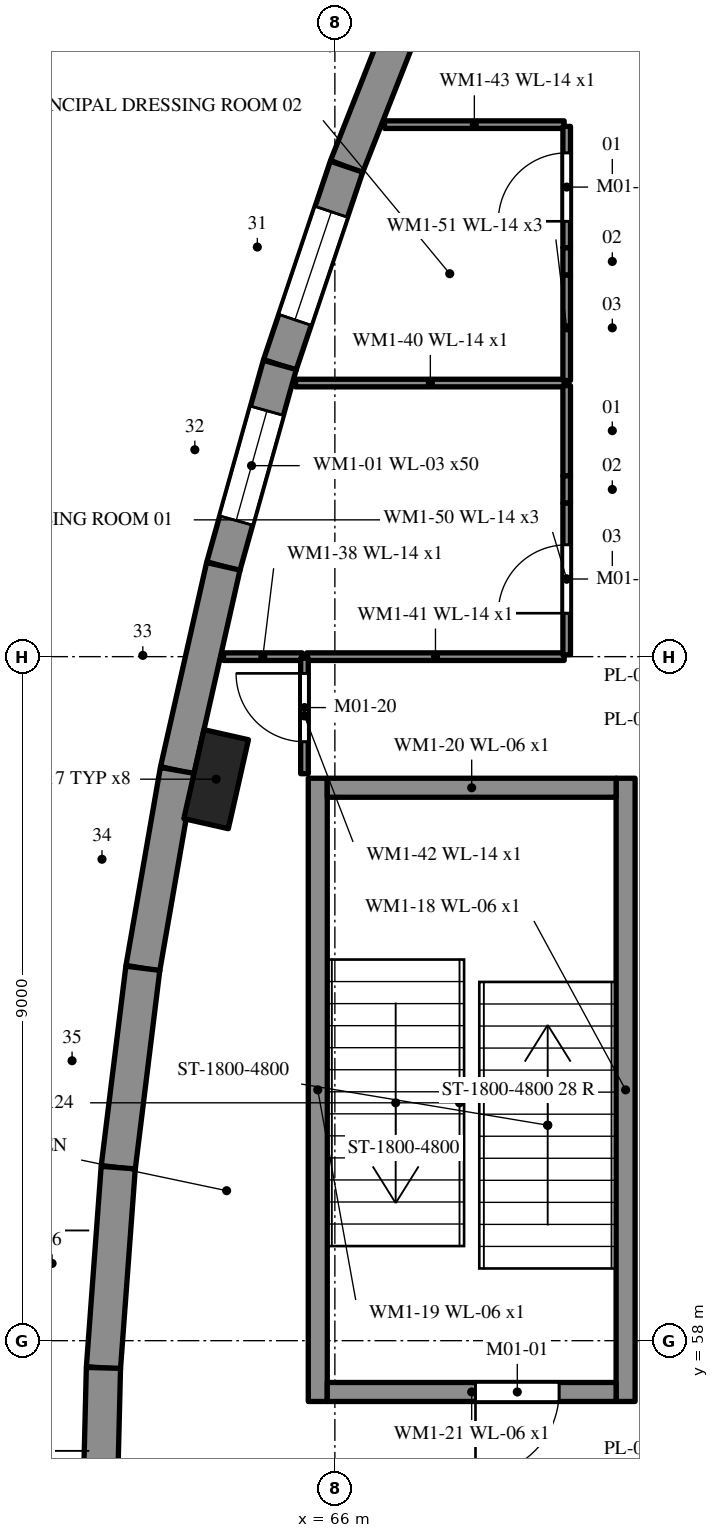
"""IFC4 building model, lengths in metres.
Left out: names, types, materials, properties, quantities, classifications, styles, units other than length and angle.
Written with IfcOpenShell. Run it as: python <this file> out.ifc"""

import sys

from ifc_helpers import new_model, si_unit, direction, frame, frame_2d, origin, origin_2d, place, context, subcontext, project, spatial, polyline, rectangle, outline, extrude, element, fill, save


model = new_model("IFC4")
c1 = context("Model", 3, precision=1e-05, world=origin(), true_north=direction((0.0, 1.0)))
c2 = subcontext(c1, "Body", "Model", "MODEL_VIEW")
j1 = project(units=[si_unit("LENGTHUNIT", "METRE"), si_unit("PLANEANGLEUNIT", "RADIAN")], contexts=[c1])
p1 = place(None, origin())
s1 = spatial("IfcSite", under=j1, at=p1, CompositionType="ELEMENT")
p2 = place(p1, origin())
s2 = spatial("IfcBuilding", under=s1, at=p2, CompositionType="ELEMENT")
p3 = place(p2, frame((0.0, 0.0, 5.4)))
s3 = spatial("IfcBuildingStorey", under=s2, at=p3, CompositionType="ELEMENT", Elevation=5.4)
p4 = place(p3, frame((67.163, 76.007, 0.0), z_axis=(0.0, 0.0, 1.0), x_axis=(-0.366920100653, -0.930252460215, 0.0)))
e1 = element("IfcWall", 1, at=p4, inside=s3, PredefinedType="SOLIDWALL", context=c2, shape_type="SweptSolid", body=[
    extrude(rectangle(XDim=2.752, YDim=0.45, at=frame_2d((1.376, 0.0))), origin(), (0.0, 0.0, 1.0), 4.8),
])
p5 = place(p3, frame((66.153, 73.447, 0.0), z_axis=(0.0, 0.0, 1.0), x_axis=(-0.318887614688, -0.947792534893, 0.0)))
e2 = element("IfcWall", 2, at=p5, inside=s3, PredefinedType="SOLIDWALL", context=c2, shape_type="SweptSolid", body=[
    extrude(rectangle(XDim=2.752, YDim=0.45, at=frame_2d((1.376, 0.0))), origin(), (0.0, 0.0, 1.0), 4.8),
])
p6 = place(p5, frame((0.626, 0.0, 0.9)))
e3 = element("IfcOpeningElement", 3, at=p6, cuts=e2, PredefinedType="OPENING", context=c2, shape_type="SweptSolid", body=[
    extrude(rectangle(XDim=1.5, YDim=2.1, at=frame_2d((0.75, 1.05))), frame((0.0, 0.235, 0.0), z_axis=(0.0, -1.0, 0.0), x_axis=(1.0, 0.0, 0.0)), (0.0, 0.0, 1.0), 0.47),
])
p7 = place(p3, frame((65.275, 70.838, 0.0), z_axis=(0.0, 0.0, 1.0), x_axis=(-0.270008269196, -0.962858003324, 0.0)))
e4 = element("IfcWall", 4, at=p7, inside=s3, PredefinedType="SOLIDWALL", context=c2, shape_type="SweptSolid", body=[
    extrude(rectangle(XDim=2.752, YDim=0.45, at=frame_2d((1.376, 0.0))), origin(), (0.0, 0.0, 1.0), 4.8),
])
p8 = place(p7, frame((0.626, 0.0, 0.9)))
e5 = element("IfcOpeningElement", 5, at=p8, cuts=e4, PredefinedType="OPENING", context=c2, shape_type="SweptSolid", body=[
    extrude(rectangle(XDim=1.5, YDim=2.1, at=frame_2d((0.75, 1.05))), frame((0.0, 0.235, 0.0), z_axis=(0.0, -1.0, 0.0), x_axis=(1.0, 0.0, 0.0)), (0.0, 0.0, 1.0), 0.47),
])
p9 = place(p3, frame((64.532, 68.188, 0.0), z_axis=(0.0, 0.0, 1.0), x_axis=(-0.220347996563, -0.975421324562, 0.0)))
e6 = element("IfcWall", 6, at=p9, inside=s3, PredefinedType="SOLIDWALL", context=c2, shape_type="SweptSolid", body=[
    extrude(rectangle(XDim=2.752, YDim=0.45, at=frame_2d((1.376, 0.0))), origin(), (0.0, 0.0, 1.0), 4.8),
])
p10 = place(p3, frame((63.926, 65.503, 0.0), z_axis=(0.0, 0.0, 1.0), x_axis=(-0.171196910379, -0.985236833394, 0.0)))
e7 = element("IfcWall", 7, at=p10, inside=s3, PredefinedType="SOLIDWALL", context=c2, shape_type="SweptSolid", body=[
    extrude(rectangle(XDim=2.643, YDim=0.45, at=frame_2d((1.321, 0.0))), origin(), (0.0, 0.0, 1.0), 4.8),
])
p11 = place(p3, frame((63.473, 62.9, 0.0), z_axis=(0.0, 0.0, 1.0), x_axis=(-0.122499610212, -0.992468561466, 0.0)))
e8 = element("IfcWall", 8, at=p11, inside=s3, PredefinedType="SOLIDWALL", context=c2, shape_type="SweptSolid", body=[
    extrude(rectangle(XDim=2.643, YDim=0.45, at=frame_2d((1.321, 0.0))), origin(), (0.0, 0.0, 1.0), 4.8),
])
p12 = place(p3, frame((63.15, 60.277, 0.0), z_axis=(0.0, 0.0, 1.0), x_axis=(-0.07363685767, -0.997285121313, 0.0)))
e9 = element("IfcWall", 9, at=p12, inside=s3, PredefinedType="SOLIDWALL", context=c2, shape_type="SweptSolid", body=[
    extrude(rectangle(XDim=2.642, YDim=0.45, at=frame_2d((1.321, 0.0))), origin(), (0.0, 0.0, 1.0), 4.8),
])
p13 = place(p3, frame((62.955, 57.642, 0.0), z_axis=(0.0, 0.0, 1.0), x_axis=(-0.024666736886, -0.999695729756, 0.0)))
e10 = element("IfcWall", 10, at=p13, inside=s3, PredefinedType="SOLIDWALL", context=c2, shape_type="SweptSolid", body=[
    extrude(rectangle(XDim=2.643, YDim=0.45, at=frame_2d((1.321, 0.0))), origin(), (0.0, 0.0, 1.0), 4.8),
])
p14 = place(p3, frame((64.438, 65.388, 0.0), z_axis=(0.0, 0.0, 1.0), x_axis=(-0.220356962886, -0.975419299024, 0.0)))
e11 = element("IfcColumn", 11, at=p14, inside=s3, PredefinedType="PILASTER", context=c2, shape_type="SweptSolid", body=[
    extrude(rectangle(XDim=1.2, YDim=0.6, at=origin_2d()), origin(), (0.0, 0.0, 1.0), 4.8),
])
for number, where, z_axis, x_axis in (
    (12, (69.825, 57.2, 0.0), (0.0, 0.0, 1.0), (0.0, 1.0, 0.0)),
    (13, (65.775, 65.4, 0.0), (0.0, 0.0, 1.0), (0.0, -1.0, 0.0)),
):
    element("IfcWall", number, at=place(p3, frame(where, z_axis=z_axis, x_axis=x_axis)), inside=s3, PredefinedType="SHEAR", context=c2, shape_type="SweptSolid", body=[
        extrude(rectangle(XDim=8.2, YDim=0.25, at=frame_2d((4.1, 0.0))), origin(), (0.0, 0.0, 1.0), 4.8),
    ])
p15 = place(p3, frame((65.9, 65.275, 0.0), z_axis=(0.0, 0.0, 1.0), x_axis=(1.0, 0.0, 0.0)))
e14 = element("IfcWall", 14, at=p15, inside=s3, PredefinedType="SHEAR", context=c2, shape_type="SweptSolid", body=[
    extrude(rectangle(XDim=3.8, YDim=0.25, at=frame_2d((1.9, 0.0))), origin(), (0.0, 0.0, 1.0), 4.8),
])
p16 = place(p3, frame((69.7, 57.325, 0.0), z_axis=(0.0, 0.0, 1.0), x_axis=(-1.0, 0.0, 0.0)))
e15 = element("IfcWall", 15, at=p16, inside=s3, PredefinedType="SHEAR", context=c2, shape_type="SweptSolid", body=[
    extrude(rectangle(XDim=3.8, YDim=0.25, at=frame_2d((1.9, 0.0))), origin(), (0.0, 0.0, 1.0), 4.8),
])
p17 = place(p16, frame((0.75, 0.0, 0.0)))
e16 = element("IfcOpeningElement", 16, at=p17, cuts=e15, PredefinedType="OPENING", context=c2, shape_type="SweptSolid", body=[
    extrude(rectangle(XDim=1.1, YDim=2.1, at=frame_2d((0.55, 1.05))), frame((0.0, 0.135, 0.0), z_axis=(0.0, -1.0, 0.0), x_axis=(1.0, 0.0, 0.0)), (0.0, 0.0, 1.0), 0.27),
])
p18 = place(p3, frame((65.57, 67.0, 0.0), z_axis=(0.0, 0.0, 1.0), x_axis=(-1.0, 0.0, 0.0)))
e17 = element("IfcWall", 17, at=p18, inside=s3, PredefinedType="PARTITIONING", context=c2, shape_type="SweptSolid", body=[
    extrude(rectangle(XDim=1.035, YDim=0.1, at=frame_2d((0.518, 0.0))), origin(), (0.0, 0.0, 1.0), 4.55),
])
p19 = place(p3, frame((65.482, 70.6, 0.0), z_axis=(0.0, 0.0, 1.0), x_axis=(1.0, 0.0, 0.0)))
e18 = element("IfcWall", 18, at=p19, inside=s3, PredefinedType="PARTITIONING", context=c2, shape_type="SweptSolid", body=[
    extrude(rectangle(XDim=3.548, YDim=0.1, at=frame_2d((1.774, 0.0))), origin(), (0.0, 0.0, 1.0), 4.55),
])
p20 = place(p3, frame((69.017, 67.0, 0.0), z_axis=(0.0, 0.0, 1.0), x_axis=(-1.0, 0.0, 0.0)))
e19 = element("IfcWall", 19, at=p20, inside=s3, PredefinedType="PARTITIONING", context=c2, shape_type="SweptSolid", body=[
    extrude(rectangle(XDim=3.387, YDim=0.1, at=frame_2d((1.693, 0.0))), origin(), (0.0, 0.0, 1.0), 4.55),
])
p21 = place(p3, frame((65.6, 66.98, 0.0), z_axis=(0.0, 0.0, 1.0), x_axis=(0.0, -1.0, 0.0)))
e20 = element("IfcWall", 20, at=p21, inside=s3, PredefinedType="PARTITIONING", context=c2, shape_type="SweptSolid", body=[
    extrude(outline(polyline([(0.0, 0.0), (1.52, 0.0), (1.52, 4.55), (0.987, 4.55), (0.985, 3.82), (0.575, 3.82), (0.573, 4.55), (0.0, 4.55), (0.0, 0.0)])), frame((0.0, 0.05, 0.0), z_axis=(0.0, -1.0, 0.0), x_axis=(1.0, 0.0, 0.0)), (0.0, 0.0, 1.0), 0.1),
])
p22 = place(p21, frame((0.2, 0.0, 0.0)))
e21 = element("IfcOpeningElement", 21, at=p22, cuts=e20, PredefinedType="OPENING", context=c2, shape_type="SweptSolid", body=[
    extrude(rectangle(XDim=0.9, YDim=2.1, at=frame_2d((0.45, 1.05))), frame((0.0, 0.06, 0.0), z_axis=(0.0, -1.0, 0.0), x_axis=(1.0, 0.0, 0.0)), (0.0, 0.0, 1.0), 0.12),
])
p23 = place(p3, frame((66.653, 74.0, 0.0), z_axis=(0.0, 0.0, 1.0), x_axis=(1.0, 0.0, 0.0)))
e22 = element("IfcWall", 22, at=p23, inside=s3, PredefinedType="PARTITIONING", context=c2, shape_type="SweptSolid", body=[
    extrude(rectangle(XDim=2.364, YDim=0.1, at=frame_2d((1.182, 0.0))), origin(), (0.0, 0.0, 1.0), 4.55),
])
p24 = place(p3, frame((69.05, 70.567, 0.0), z_axis=(0.0, 0.0, 1.0), x_axis=(0.0, -1.0, 0.0)))
e23 = element("IfcWall", 23, at=p24, inside=s3, PredefinedType="PARTITIONING", context=c2, shape_type="SweptSolid", body=[
    extrude(rectangle(XDim=1.187, YDim=0.1, at=frame_2d((0.594, 0.0))), origin(), (0.0, 0.0, 1.0), 4.55),
])
p25 = place(p3, frame((69.05, 69.38, 0.0), z_axis=(0.0, 0.0, 1.0), x_axis=(0.0, -1.0, 0.0)))
e24 = element("IfcWall", 24, at=p25, inside=s3, PredefinedType="PARTITIONING", context=c2, shape_type="SweptSolid", body=[
    extrude(rectangle(XDim=0.36, YDim=0.1, at=frame_2d((0.18, 0.0))), origin(), (0.0, 0.0, 1.0), 3.92),
])
p26 = place(p3, frame((69.05, 69.02, 0.0), z_axis=(0.0, 0.0, 1.0), x_axis=(0.0, -1.0, 0.0)))
e25 = element("IfcWall", 25, at=p26, inside=s3, PredefinedType="PARTITIONING", context=c2, shape_type="SweptSolid", body=[
    extrude(rectangle(XDim=1.997, YDim=0.1, at=frame_2d((0.999, 0.0))), origin(), (0.0, 0.0, 1.0), 4.55),
])
p27 = place(p26, frame((0.548, 0.0, 0.0)))
e26 = element("IfcOpeningElement", 26, at=p27, cuts=e25, PredefinedType="OPENING", context=c2, shape_type="SweptSolid", body=[
    extrude(rectangle(XDim=0.9, YDim=2.1, at=frame_2d((0.45, 1.05))), frame((0.0, 0.06, 0.0), z_axis=(0.0, -1.0, 0.0), x_axis=(1.0, 0.0, 0.0)), (0.0, 0.0, 1.0), 0.12),
])
p28 = place(p3, frame((69.05, 73.977, 0.0), z_axis=(0.0, 0.0, 1.0), x_axis=(0.0, -1.0, 0.0)))
e27 = element("IfcWall", 27, at=p28, inside=s3, PredefinedType="PARTITIONING", context=c2, shape_type="SweptSolid", body=[
    extrude(rectangle(XDim=1.597, YDim=0.1, at=frame_2d((0.798, 0.0))), origin(), (0.0, 0.0, 1.0), 4.55),
])
p29 = place(p28, frame((0.348, 0.0, 0.0)))
e28 = element("IfcOpeningElement", 28, at=p29, cuts=e27, PredefinedType="OPENING", context=c2, shape_type="SweptSolid", body=[
    extrude(rectangle(XDim=0.9, YDim=2.1, at=frame_2d((0.45, 1.05))), frame((0.0, 0.06, 0.0), z_axis=(0.0, -1.0, 0.0), x_axis=(1.0, 0.0, 0.0)), (0.0, 0.0, 1.0), 0.12),
])
p30 = place(p3, frame((69.05, 72.38, 0.0), z_axis=(0.0, 0.0, 1.0), x_axis=(0.0, -1.0, 0.0)))
e29 = element("IfcWall", 29, at=p30, inside=s3, PredefinedType="PARTITIONING", context=c2, shape_type="SweptSolid", body=[
    extrude(rectangle(XDim=0.36, YDim=0.1, at=frame_2d((0.18, 0.0))), origin(), (0.0, 0.0, 1.0), 3.92),
])
p31 = place(p3, frame((69.05, 72.02, 0.0), z_axis=(0.0, 0.0, 1.0), x_axis=(0.0, -1.0, 0.0)))
e30 = element("IfcWall", 30, at=p31, inside=s3, PredefinedType="PARTITIONING", context=c2, shape_type="SweptSolid", body=[
    extrude(rectangle(XDim=1.387, YDim=0.1, at=frame_2d((0.693, 0.0))), origin(), (0.0, 0.0, 1.0), 4.55),
])
p32 = place(p17, origin())
e31 = element("IfcDoor", 31, at=p32, inside=s3, OperationType="SINGLE_SWING_RIGHT", PredefinedType="DOOR", context=c2, shape_type="SweptSolid", body=[
    extrude(rectangle(XDim=1.1, YDim=2.1, at=frame_2d((0.55, 1.05))), frame((0.0, 0.025, 0.0), z_axis=(0.0, -1.0, 0.0), x_axis=(1.0, 0.0, 0.0)), (0.0, 0.0, 1.0), 0.05),
])
fill(e16, e31)
p33 = place(p6, origin())
e32 = element("IfcWindow", 32, at=p33, inside=s3, PartitioningType="SINGLE_PANEL", PredefinedType="WINDOW", context=c2, shape_type="SweptSolid", body=[
    extrude(rectangle(XDim=1.5, YDim=2.1, at=frame_2d((0.75, 1.05))), frame((0.0, 0.03, 0.0), z_axis=(0.0, -1.0, 0.0), x_axis=(1.0, 0.0, 0.0)), (0.0, 0.0, 1.0), 0.06),
])
fill(e3, e32)
p34 = place(p8, origin())
e33 = element("IfcWindow", 33, at=p34, inside=s3, PartitioningType="SINGLE_PANEL", PredefinedType="WINDOW", context=c2, shape_type="SweptSolid", body=[
    extrude(rectangle(XDim=1.5, YDim=2.1, at=frame_2d((0.75, 1.05))), frame((0.0, 0.03, 0.0), z_axis=(0.0, -1.0, 0.0), x_axis=(1.0, 0.0, 0.0)), (0.0, 0.0, 1.0), 0.06),
])
fill(e5, e33)
p35 = place(p27, frame((0.9, 0.0, 0.0), z_axis=(0.0, 0.0, 1.0), x_axis=(-1.0, 0.0, 0.0)))
e34 = element("IfcDoor", 34, at=p35, inside=s3, OperationType="SINGLE_SWING_LEFT", PredefinedType="DOOR", context=c2, shape_type="SweptSolid", body=[
    extrude(rectangle(XDim=0.9, YDim=2.1, at=frame_2d((0.45, 1.05))), frame((0.0, 0.025, 0.0), z_axis=(0.0, -1.0, 0.0), x_axis=(1.0, 0.0, 0.0)), (0.0, 0.0, 1.0), 0.05),
])
fill(e26, e34)
p36 = place(p29, frame((0.9, 0.0, 0.0), z_axis=(0.0, 0.0, 1.0), x_axis=(-1.0, 0.0, 0.0)))
e35 = element("IfcDoor", 35, at=p36, inside=s3, OperationType="SINGLE_SWING_LEFT", PredefinedType="DOOR", context=c2, shape_type="SweptSolid", body=[
    extrude(rectangle(XDim=0.9, YDim=2.1, at=frame_2d((0.45, 1.05))), frame((0.0, 0.025, 0.0), z_axis=(0.0, -1.0, 0.0), x_axis=(1.0, 0.0, 0.0)), (0.0, 0.0, 1.0), 0.05),
])
fill(e28, e35)
p37 = place(p22, frame((0.9, 0.0, 0.0), z_axis=(0.0, 0.0, 1.0), x_axis=(-1.0, 0.0, 0.0)))
e36 = element("IfcDoor", 36, at=p37, inside=s3, OperationType="SINGLE_SWING_RIGHT", PredefinedType="DOOR", context=c2, shape_type="SweptSolid", body=[
    extrude(rectangle(XDim=0.9, YDim=2.1, at=frame_2d((0.45, 1.05))), frame((0.0, 0.025, 0.0), z_axis=(0.0, -1.0, 0.0), x_axis=(1.0, 0.0, 0.0)), (0.0, 0.0, 1.0), 0.05),
])
fill(e21, e36)
save(model, sys.argv[1])
